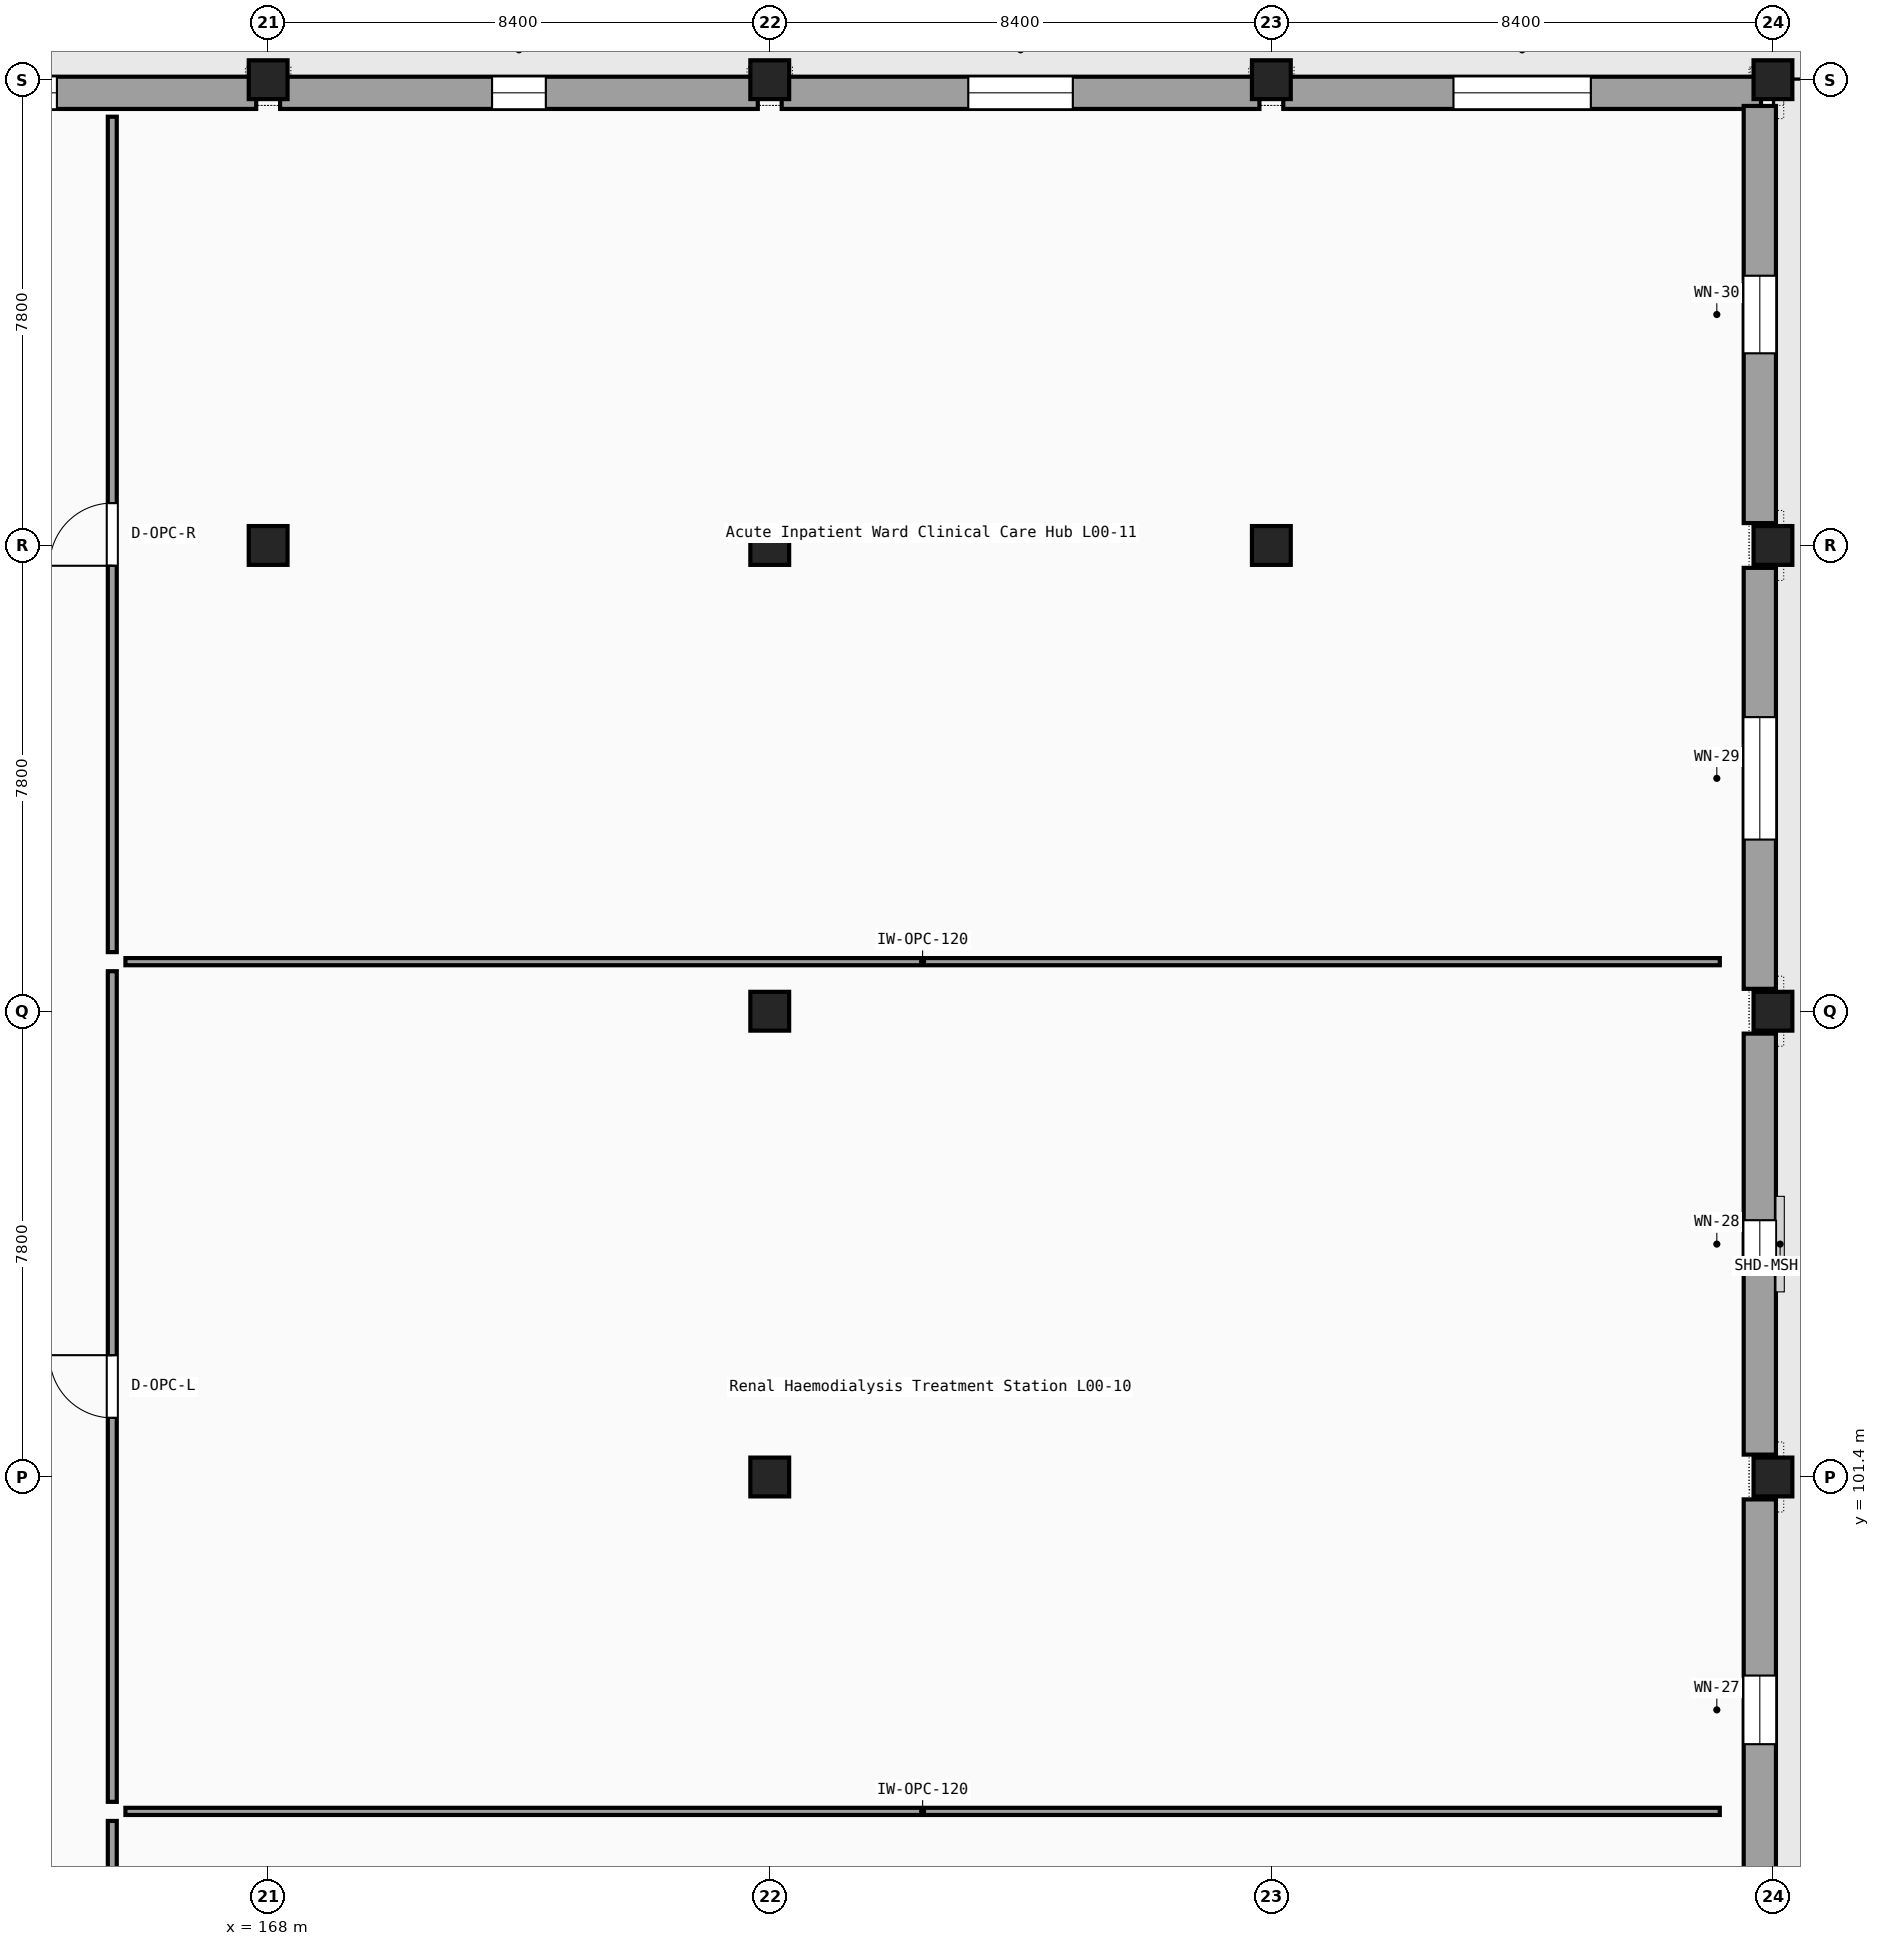
"""IFC4 building model, lengths in metres.
Left out: names, types, materials, properties, quantities, classifications, styles, units other than length and angle.
Written with IfcOpenShell. Run it as: python <this file> out.ifc"""

import sys

from ifc_helpers import new_model, si_unit, direction, frame, frame_2d, origin, origin_2d, place, context, subcontext, project, spatial, rectangle, i_section, extrude, element, fill, save


model = new_model("IFC4")
c1 = context("Model", 3, precision=1e-05, world=origin(), true_north=direction((0.0, 1.0)))
c2 = subcontext(c1, "Body", "Model", "MODEL_VIEW")
j1 = project(units=[si_unit("LENGTHUNIT", "METRE"), si_unit("PLANEANGLEUNIT", "RADIAN")], contexts=[c1])
p1 = place(None, origin())
s1 = spatial("IfcSite", under=j1, at=p1, CompositionType="ELEMENT")
p2 = place(p1, origin())
s2 = spatial("IfcBuilding", under=s1, at=p2, CompositionType="ELEMENT")
p3 = place(p2, origin())
s3 = spatial("IfcBuildingStorey", under=s2, at=p3, CompositionType="ELEMENT", Elevation=0.0)
for number, where, z_axis, x_axis in (
    (1, (168.0, 117.0, 0.0), (0.0, 0.0, 1.0), (1.0, 0.0, 0.0)),
    (2, (168.0, 124.8, 0.0), (0.0, 0.0, 1.0), (1.0, 0.0, 0.0)),
    (3, (176.4, 101.4, 0.0), (0.0, 0.0, 1.0), (1.0, 0.0, 0.0)),
    (4, (176.4, 109.2, 0.0), (0.0, 0.0, 1.0), (1.0, 0.0, 0.0)),
    (5, (176.4, 117.0, 0.0), (0.0, 0.0, 1.0), (1.0, 0.0, 0.0)),
    (6, (176.4, 124.8, 0.0), (0.0, 0.0, 1.0), (1.0, 0.0, 0.0)),
    (7, (184.8, 117.0, 0.0), (0.0, 0.0, 1.0), (1.0, 0.0, 0.0)),
    (8, (184.8, 124.8, 0.0), (0.0, 0.0, 1.0), (1.0, 0.0, 0.0)),
    (9, (193.2, 101.4, 0.0), (0.0, 0.0, 1.0), (1.0, 0.0, 0.0)),
    (10, (193.2, 109.2, 0.0), (0.0, 0.0, 1.0), (1.0, 0.0, 0.0)),
    (11, (193.2, 117.0, 0.0), (0.0, 0.0, 1.0), (1.0, 0.0, 0.0)),
    (12, (193.2, 124.8, 0.0), (0.0, 0.0, 1.0), (1.0, 0.0, 0.0)),
):
    element("IfcColumn", number, at=place(p3, frame(where, z_axis=z_axis, x_axis=x_axis)), inside=s3, PredefinedType="COLUMN", context=c2, shape_type="SweptSolid", body=[
        extrude(i_section(OverallWidth=0.3, OverallDepth=0.65, WebThickness=0.016, FlangeThickness=0.031, FilletRadius=0.027, at=origin_2d()), origin(), (0.0, 0.0, 1.0), 5.1),
    ])
p4 = place(p3, frame((160.075, 124.58, 0.0), z_axis=(0.0, 0.0, 1.0), x_axis=(1.0, 0.0, 0.0)))
e13 = element("IfcWall", 13, at=p4, inside=s3, PredefinedType="SOLIDWALL", context=c2, shape_type="SweptSolid", body=[
    extrude(rectangle(XDim=7.725, YDim=0.54, at=frame_2d((3.863, 0.0))), origin(), (0.0, 0.0, 1.0), 4.38),
])
p5 = place(p4, frame((3.337, 0.0, 1.3)))
e14 = element("IfcOpeningElement", 14, at=p5, cuts=e13, PredefinedType="OPENING", context=c2, shape_type="SweptSolid", body=[
    extrude(rectangle(XDim=1.05, YDim=1.2, at=frame_2d((0.525, 0.6))), frame((0.0, 0.28, 0.0), z_axis=(0.0, -1.0, 0.0), x_axis=(1.0, 0.0, 0.0)), (0.0, 0.0, 1.0), 0.56),
])
p6 = place(p3, frame((168.2, 124.58, 0.0), z_axis=(0.0, 0.0, 1.0), x_axis=(1.0, 0.0, 0.0)))
e15 = element("IfcWall", 15, at=p6, inside=s3, PredefinedType="SOLIDWALL", context=c2, shape_type="SweptSolid", body=[
    extrude(rectangle(XDim=8.0, YDim=0.54, at=frame_2d((4.0, 0.0))), origin(), (0.0, 0.0, 1.0), 4.38),
])
p7 = place(p6, frame((3.55, 0.0, 0.9)))
e16 = element("IfcOpeningElement", 16, at=p7, cuts=e15, PredefinedType="OPENING", context=c2, shape_type="SweptSolid", body=[
    extrude(rectangle(XDim=0.9, YDim=1.8, at=frame_2d((0.45, 0.9))), frame((0.0, 0.28, 0.0), z_axis=(0.0, -1.0, 0.0), x_axis=(1.0, 0.0, 0.0)), (0.0, 0.0, 1.0), 0.56),
])
p8 = place(p3, frame((176.6, 124.58, 0.0), z_axis=(0.0, 0.0, 1.0), x_axis=(1.0, 0.0, 0.0)))
e17 = element("IfcWall", 17, at=p8, inside=s3, PredefinedType="SOLIDWALL", context=c2, shape_type="SweptSolid", body=[
    extrude(rectangle(XDim=8.0, YDim=0.54, at=frame_2d((4.0, 0.0))), origin(), (0.0, 0.0, 1.0), 4.38),
])
p9 = place(p8, frame((3.125, 0.0, 0.75)))
e18 = element("IfcOpeningElement", 18, at=p9, cuts=e17, PredefinedType="OPENING", context=c2, shape_type="SweptSolid", body=[
    extrude(rectangle(XDim=1.75, YDim=1.9, at=frame_2d((0.875, 0.95))), frame((0.0, 0.28, 0.0), z_axis=(0.0, -1.0, 0.0), x_axis=(1.0, 0.0, 0.0)), (0.0, 0.0, 1.0), 0.56),
])
p10 = place(p3, frame((185.0, 124.58, 0.0), z_axis=(0.0, 0.0, 1.0), x_axis=(1.0, 0.0, 0.0)))
e19 = element("IfcWall", 19, at=p10, inside=s3, PredefinedType="SOLIDWALL", context=c2, shape_type="SweptSolid", body=[
    extrude(rectangle(XDim=8.0, YDim=0.54, at=frame_2d((4.0, 0.0))), origin(), (0.0, 0.0, 1.0), 4.38),
])
p11 = place(p10, frame((2.85, 0.0, 0.95)))
e20 = element("IfcOpeningElement", 20, at=p11, cuts=e19, PredefinedType="OPENING", context=c2, shape_type="SweptSolid", body=[
    extrude(rectangle(XDim=2.3, YDim=1.55, at=frame_2d((1.15, 0.775))), frame((0.0, 0.28, 0.0), z_axis=(0.0, -1.0, 0.0), x_axis=(1.0, 0.0, 0.0)), (0.0, 0.0, 1.0), 0.56),
])
p12 = place(p3, frame((192.98, 93.975, 0.0), z_axis=(0.0, 0.0, 1.0), x_axis=(0.0, 1.0, 0.0)))
e21 = element("IfcWall", 21, at=p12, inside=s3, PredefinedType="SOLIDWALL", context=c2, shape_type="SweptSolid", body=[
    extrude(rectangle(XDim=7.05, YDim=0.54, at=frame_2d((3.525, 0.0))), origin(), (0.0, 0.0, 1.0), 4.33),
])
p13 = place(p12, frame((2.95, 0.0, 0.7)))
e22 = element("IfcOpeningElement", 22, at=p13, cuts=e21, PredefinedType="OPENING", context=c2, shape_type="SweptSolid", body=[
    extrude(rectangle(XDim=1.15, YDim=1.95, at=frame_2d((0.575, 0.975))), frame((0.0, 0.28, 0.0), z_axis=(0.0, -1.0, 0.0), x_axis=(1.0, 0.0, 0.0)), (0.0, 0.0, 1.0), 0.56),
])
p14 = place(p3, frame((192.98, 101.775, 0.0), z_axis=(0.0, 0.0, 1.0), x_axis=(0.0, 1.0, 0.0)))
e23 = element("IfcWall", 23, at=p14, inside=s3, PredefinedType="SOLIDWALL", context=c2, shape_type="SweptSolid", body=[
    extrude(rectangle(XDim=7.05, YDim=0.54, at=frame_2d((3.525, 0.0))), origin(), (0.0, 0.0, 1.0), 4.33),
])
p15 = place(p14, frame((3.125, 0.0, 0.95)))
e24 = element("IfcOpeningElement", 24, at=p15, cuts=e23, PredefinedType="OPENING", context=c2, shape_type="SweptSolid", body=[
    extrude(rectangle(XDim=0.8, YDim=1.65, at=frame_2d((0.4, 0.825))), frame((0.0, 0.28, 0.0), z_axis=(0.0, -1.0, 0.0), x_axis=(1.0, 0.0, 0.0)), (0.0, 0.0, 1.0), 0.56),
])
p16 = place(p3, frame((192.98, 109.575, 0.0), z_axis=(0.0, 0.0, 1.0), x_axis=(0.0, 1.0, 0.0)))
e25 = element("IfcWall", 25, at=p16, inside=s3, PredefinedType="SOLIDWALL", context=c2, shape_type="SweptSolid", body=[
    extrude(rectangle(XDim=7.05, YDim=0.54, at=frame_2d((3.525, 0.0))), origin(), (0.0, 0.0, 1.0), 4.33),
])
p17 = place(p16, frame((2.5, 0.0, 1.05)))
e26 = element("IfcOpeningElement", 26, at=p17, cuts=e25, PredefinedType="OPENING", context=c2, shape_type="SweptSolid", body=[
    extrude(rectangle(XDim=2.05, YDim=1.4, at=frame_2d((1.025, 0.7))), frame((0.0, 0.28, 0.0), z_axis=(0.0, -1.0, 0.0), x_axis=(1.0, 0.0, 0.0)), (0.0, 0.0, 1.0), 0.56),
])
p18 = place(p3, frame((192.98, 117.375, 0.0), z_axis=(0.0, 0.0, 1.0), x_axis=(0.0, 1.0, 0.0)))
e27 = element("IfcWall", 27, at=p18, inside=s3, PredefinedType="SOLIDWALL", context=c2, shape_type="SweptSolid", body=[
    extrude(rectangle(XDim=6.985, YDim=0.54, at=frame_2d((3.493, 0.0))), origin(), (0.0, 0.0, 1.0), 4.33),
])
p19 = place(p18, frame((2.843, 0.0, 0.9)))
e28 = element("IfcOpeningElement", 28, at=p19, cuts=e27, PredefinedType="OPENING", context=c2, shape_type="SweptSolid", body=[
    extrude(rectangle(XDim=1.3, YDim=1.6, at=frame_2d((0.65, 0.8))), frame((0.0, 0.28, 0.0), z_axis=(0.0, -1.0, 0.0), x_axis=(1.0, 0.0, 0.0)), (0.0, 0.0, 1.0), 0.56),
])
p20 = place(p3, frame((165.39, 81.65, 0.0), z_axis=(0.0, 0.0, 1.0), x_axis=(0.0, 1.0, 0.0)))
e29 = element("IfcWall", 29, at=p20, inside=s3, PredefinedType="PARTITIONING", context=c2, shape_type="SweptSolid", body=[
    extrude(rectangle(XDim=13.99, YDim=0.15, at=frame_2d((6.995, 0.0))), origin(), (0.0, 0.0, 1.0), 4.33),
])
p21 = place(p20, frame((6.47, 0.0, 0.0)))
e30 = element("IfcOpeningElement", 30, at=p21, cuts=e29, PredefinedType="OPENING", context=c2, shape_type="SweptSolid", body=[
    extrude(rectangle(XDim=1.05, YDim=2.15, at=frame_2d((0.525, 1.075))), frame((0.0, 0.085, 0.0), z_axis=(0.0, -1.0, 0.0), x_axis=(1.0, 0.0, 0.0)), (0.0, 0.0, 1.0), 0.17),
])
p22 = place(p3, frame((165.61, 95.8, 0.0), z_axis=(0.0, 0.0, 1.0), x_axis=(1.0, 0.0, 0.0)))
e31 = element("IfcWall", 31, at=p22, inside=s3, PredefinedType="PARTITIONING", context=c2, shape_type="SweptSolid", body=[
    extrude(rectangle(XDim=26.7, YDim=0.12, at=frame_2d((13.35, 0.0))), origin(), (0.0, 0.0, 1.0), 4.38),
])
p23 = place(p3, frame((165.39, 95.96, 0.0), z_axis=(0.0, 0.0, 1.0), x_axis=(0.0, 1.0, 0.0)))
e32 = element("IfcWall", 32, at=p23, inside=s3, PredefinedType="PARTITIONING", context=c2, shape_type="SweptSolid", body=[
    extrude(rectangle(XDim=13.91, YDim=0.15, at=frame_2d((6.955, 0.0))), origin(), (0.0, 0.0, 1.0), 4.33),
])
p24 = place(p23, frame((6.43, 0.0, 0.0)))
e33 = element("IfcOpeningElement", 33, at=p24, cuts=e32, PredefinedType="OPENING", context=c2, shape_type="SweptSolid", body=[
    extrude(rectangle(XDim=1.05, YDim=2.15, at=frame_2d((0.525, 1.075))), frame((0.0, 0.085, 0.0), z_axis=(0.0, -1.0, 0.0), x_axis=(1.0, 0.0, 0.0)), (0.0, 0.0, 1.0), 0.17),
])
p25 = place(p3, frame((165.61, 110.03, 0.0), z_axis=(0.0, 0.0, 1.0), x_axis=(1.0, 0.0, 0.0)))
e34 = element("IfcWall", 34, at=p25, inside=s3, PredefinedType="PARTITIONING", context=c2, shape_type="SweptSolid", body=[
    extrude(rectangle(XDim=26.7, YDim=0.12, at=frame_2d((13.35, 0.0))), origin(), (0.0, 0.0, 1.0), 4.38),
])
p26 = place(p3, frame((165.39, 110.19, 0.0), z_axis=(0.0, 0.0, 1.0), x_axis=(0.0, 1.0, 0.0)))
e35 = element("IfcWall", 35, at=p26, inside=s3, PredefinedType="PARTITIONING", context=c2, shape_type="SweptSolid", body=[
    extrude(rectangle(XDim=13.99, YDim=0.15, at=frame_2d((6.995, 0.0))), origin(), (0.0, 0.0, 1.0), 4.33),
])
p27 = place(p26, frame((6.47, 0.0, 0.0)))
e36 = element("IfcOpeningElement", 36, at=p27, cuts=e35, PredefinedType="OPENING", context=c2, shape_type="SweptSolid", body=[
    extrude(rectangle(XDim=1.05, YDim=2.15, at=frame_2d((0.525, 1.075))), frame((0.0, 0.085, 0.0), z_axis=(0.0, -1.0, 0.0), x_axis=(1.0, 0.0, 0.0)), (0.0, 0.0, 1.0), 0.17),
])
p28 = place(p5, origin())
e37 = element("IfcWindow", 37, at=p28, inside=s3, PartitioningType="SINGLE_PANEL", PredefinedType="WINDOW", context=c2, shape_type="SweptSolid", body=[
    extrude(rectangle(XDim=1.05, YDim=1.2, at=frame_2d((0.525, 0.6))), frame((0.0, 0.03, 0.0), z_axis=(0.0, -1.0, 0.0), x_axis=(1.0, 0.0, 0.0)), (0.0, 0.0, 1.0), 0.06),
])
fill(e14, e37)
p29 = place(p7, origin())
e38 = element("IfcWindow", 38, at=p29, inside=s3, PartitioningType="SINGLE_PANEL", PredefinedType="WINDOW", context=c2, shape_type="SweptSolid", body=[
    extrude(rectangle(XDim=0.9, YDim=1.8, at=frame_2d((0.45, 0.9))), frame((0.0, 0.03, 0.0), z_axis=(0.0, -1.0, 0.0), x_axis=(1.0, 0.0, 0.0)), (0.0, 0.0, 1.0), 0.06),
])
fill(e16, e38)
p30 = place(p9, origin())
e39 = element("IfcWindow", 39, at=p30, inside=s3, PartitioningType="SINGLE_PANEL", PredefinedType="WINDOW", context=c2, shape_type="SweptSolid", body=[
    extrude(rectangle(XDim=1.75, YDim=1.9, at=frame_2d((0.875, 0.95))), frame((0.0, 0.03, 0.0), z_axis=(0.0, -1.0, 0.0), x_axis=(1.0, 0.0, 0.0)), (0.0, 0.0, 1.0), 0.06),
])
fill(e18, e39)
p31 = place(p11, origin())
e40 = element("IfcWindow", 40, at=p31, inside=s3, PartitioningType="SINGLE_PANEL", PredefinedType="WINDOW", context=c2, shape_type="SweptSolid", body=[
    extrude(rectangle(XDim=2.3, YDim=1.55, at=frame_2d((1.15, 0.775))), frame((0.0, 0.03, 0.0), z_axis=(0.0, -1.0, 0.0), x_axis=(1.0, 0.0, 0.0)), (0.0, 0.0, 1.0), 0.06),
])
fill(e20, e40)
p32 = place(p13, origin())
e41 = element("IfcWindow", 41, at=p32, inside=s3, PartitioningType="SINGLE_PANEL", PredefinedType="WINDOW", context=c2, shape_type="SweptSolid", body=[
    extrude(rectangle(XDim=1.15, YDim=1.95, at=frame_2d((0.575, 0.975))), frame((0.0, 0.03, 0.0), z_axis=(0.0, -1.0, 0.0), x_axis=(1.0, 0.0, 0.0)), (0.0, 0.0, 1.0), 0.06),
])
fill(e22, e41)
p33 = place(p15, origin())
e42 = element("IfcWindow", 42, at=p33, inside=s3, PartitioningType="SINGLE_PANEL", PredefinedType="WINDOW", context=c2, shape_type="SweptSolid", body=[
    extrude(rectangle(XDim=0.8, YDim=1.65, at=frame_2d((0.4, 0.825))), frame((0.0, 0.03, 0.0), z_axis=(0.0, -1.0, 0.0), x_axis=(1.0, 0.0, 0.0)), (0.0, 0.0, 1.0), 0.06),
])
fill(e24, e42)
p34 = place(p17, origin())
e43 = element("IfcWindow", 43, at=p34, inside=s3, PartitioningType="SINGLE_PANEL", PredefinedType="WINDOW", context=c2, shape_type="SweptSolid", body=[
    extrude(rectangle(XDim=2.05, YDim=1.4, at=frame_2d((1.025, 0.7))), frame((0.0, 0.03, 0.0), z_axis=(0.0, -1.0, 0.0), x_axis=(1.0, 0.0, 0.0)), (0.0, 0.0, 1.0), 0.06),
])
fill(e26, e43)
p35 = place(p19, origin())
e44 = element("IfcWindow", 44, at=p35, inside=s3, PartitioningType="SINGLE_PANEL", PredefinedType="WINDOW", context=c2, shape_type="SweptSolid", body=[
    extrude(rectangle(XDim=1.3, YDim=1.6, at=frame_2d((0.65, 0.8))), frame((0.0, 0.03, 0.0), z_axis=(0.0, -1.0, 0.0), x_axis=(1.0, 0.0, 0.0)), (0.0, 0.0, 1.0), 0.06),
])
fill(e28, e44)
p36 = place(p24, origin())
e45 = element("IfcDoor", 45, at=p36, inside=s3, OperationType="SINGLE_SWING_RIGHT", PredefinedType="DOOR", context=c2, shape_type="SweptSolid", body=[
    extrude(rectangle(XDim=1.05, YDim=2.15, at=frame_2d((0.525, 1.075))), frame((0.0, 0.025, 0.0), z_axis=(0.0, -1.0, 0.0), x_axis=(1.0, 0.0, 0.0)), (0.0, 0.0, 1.0), 0.05),
])
fill(e33, e45)
p37 = place(p27, origin())
e46 = element("IfcDoor", 46, at=p37, inside=s3, OperationType="SINGLE_SWING_LEFT", PredefinedType="DOOR", context=c2, shape_type="SweptSolid", body=[
    extrude(rectangle(XDim=1.05, YDim=2.15, at=frame_2d((0.525, 1.075))), frame((0.0, 0.025, 0.0), z_axis=(0.0, -1.0, 0.0), x_axis=(1.0, 0.0, 0.0)), (0.0, 0.0, 1.0), 0.05),
])
fill(e36, e46)
save(model, sys.argv[1])
